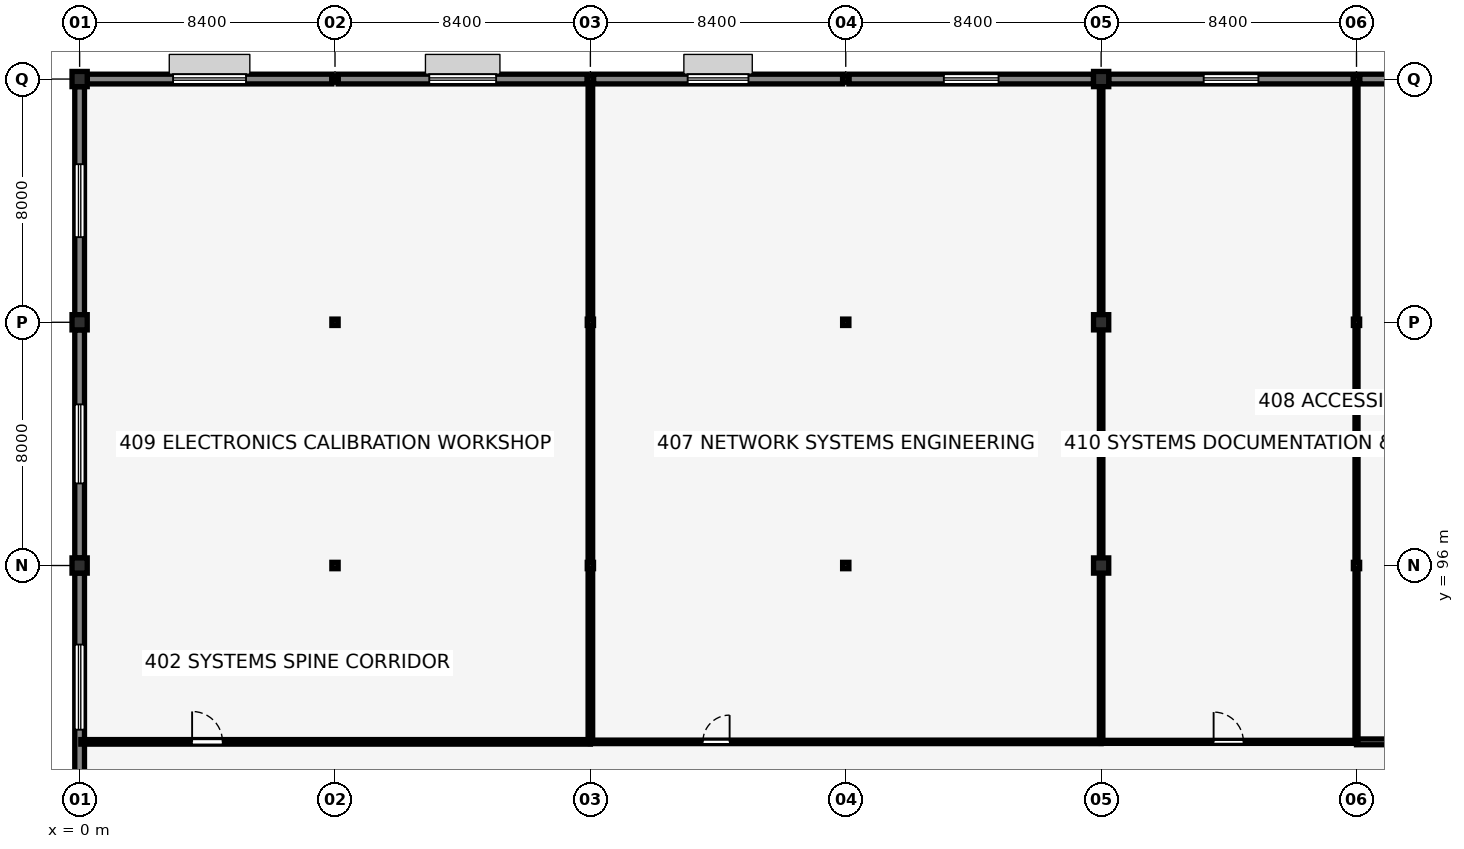
"""IFC4 building model, lengths in metres.
Left out: names, types, materials, properties, quantities, classifications, styles, units other than length and angle.
Written with IfcOpenShell. Run it as: python <this file> out.ifc"""

import sys

from ifc_helpers import new_model, si_unit, direction, frame, frame_2d, origin, origin_2d, place, context, subcontext, project, spatial, rectangle, i_section, extrude, element, fill, save


model = new_model("IFC4")
c1 = context("Model", 3, precision=1e-05, world=origin(), true_north=direction((0.0, 1.0)))
c2 = subcontext(c1, "Body", "Model", "MODEL_VIEW")
j1 = project(units=[si_unit("LENGTHUNIT", "METRE"), si_unit("PLANEANGLEUNIT", "RADIAN")], contexts=[c1])
p1 = place(None, origin())
s1 = spatial("IfcSite", under=j1, at=p1, CompositionType="ELEMENT")
p2 = place(p1, origin())
s2 = spatial("IfcBuilding", under=s1, at=p2, CompositionType="ELEMENT")
p3 = place(p2, frame((0.0, 0.0, 17.2)))
s3 = spatial("IfcBuildingStorey", under=s2, at=p3, CompositionType="ELEMENT", Elevation=17.2)
for number, where, z_axis, x_axis in (
    (1, (0.0, 96.0, 0.0), (0.0, 0.0, 1.0), (1.0, 0.0, 0.0)),
    (2, (0.0, 104.0, 0.0), (0.0, 0.0, 1.0), (1.0, 0.0, 0.0)),
    (3, (0.0, 112.0, 0.0), (0.0, 0.0, 1.0), (1.0, 0.0, 0.0)),
):
    element("IfcColumn", number, at=place(p3, frame(where, z_axis=z_axis, x_axis=x_axis)), inside=s3, PredefinedType="COLUMN", context=c2, shape_type="SweptSolid", body=[
        extrude(rectangle(XDim=0.5, YDim=0.5, at=origin_2d()), origin(), (0.0, 0.0, 1.0), 3.59),
    ])
for number, where, z_axis, x_axis in (
    (4, (8.4, 96.0, 0.0), (0.0, 0.0, 1.0), (1.0, 0.0, 0.0)),
    (5, (8.4, 104.0, 0.0), (0.0, 0.0, 1.0), (1.0, 0.0, 0.0)),
    (6, (8.4, 112.0, 0.0), (0.0, 0.0, 1.0), (1.0, 0.0, 0.0)),
    (7, (16.8, 96.0, 0.0), (0.0, 0.0, 1.0), (1.0, 0.0, 0.0)),
    (8, (16.8, 104.0, 0.0), (0.0, 0.0, 1.0), (1.0, 0.0, 0.0)),
    (9, (16.8, 112.0, 0.0), (0.0, 0.0, 1.0), (1.0, 0.0, 0.0)),
    (10, (25.2, 96.0, 0.0), (0.0, 0.0, 1.0), (1.0, 0.0, 0.0)),
    (11, (25.2, 104.0, 0.0), (0.0, 0.0, 1.0), (1.0, 0.0, 0.0)),
    (12, (25.2, 112.0, 0.0), (0.0, 0.0, 1.0), (1.0, 0.0, 0.0)),
):
    element("IfcColumn", number, at=place(p3, frame(where, z_axis=z_axis, x_axis=x_axis)), inside=s3, PredefinedType="COLUMN", context=c2, shape_type="SweptSolid", body=[
        extrude(i_section(OverallWidth=0.206, OverallDepth=0.21, WebThickness=0.01, FlangeThickness=0.014, FilletRadius=0.01, at=origin_2d()), origin(), (0.0, 0.0, 1.0), 3.59),
    ])
for number, where, z_axis, x_axis in (
    (13, (33.6, 96.0, 0.0), (0.0, 0.0, 1.0), (1.0, 0.0, 0.0)),
    (14, (33.6, 104.0, 0.0), (0.0, 0.0, 1.0), (1.0, 0.0, 0.0)),
    (15, (33.6, 112.0, 0.0), (0.0, 0.0, 1.0), (1.0, 0.0, 0.0)),
):
    element("IfcColumn", number, at=place(p3, frame(where, z_axis=z_axis, x_axis=x_axis)), inside=s3, PredefinedType="COLUMN", context=c2, shape_type="SweptSolid", body=[
        extrude(rectangle(XDim=0.5, YDim=0.5, at=origin_2d()), origin(), (0.0, 0.0, 1.0), 3.59),
    ])
for number, where, z_axis, x_axis in (
    (16, (42.0, 96.0, 0.0), (0.0, 0.0, 1.0), (1.0, 0.0, 0.0)),
    (17, (42.0, 104.0, 0.0), (0.0, 0.0, 1.0), (1.0, 0.0, 0.0)),
    (18, (42.0, 112.0, 0.0), (0.0, 0.0, 1.0), (1.0, 0.0, 0.0)),
):
    element("IfcColumn", number, at=place(p3, frame(where, z_axis=z_axis, x_axis=x_axis)), inside=s3, PredefinedType="COLUMN", context=c2, shape_type="SweptSolid", body=[
        extrude(i_section(OverallWidth=0.206, OverallDepth=0.21, WebThickness=0.01, FlangeThickness=0.014, FilletRadius=0.01, at=origin_2d()), origin(), (0.0, 0.0, 1.0), 3.59),
    ])
p4 = place(p3, frame((0.0, 88.25, 0.0), z_axis=(0.0, 0.0, 1.0), x_axis=(0.0, 1.0, 0.0)))
e19 = element("IfcWall", 19, at=p4, inside=s3, PredefinedType="SOLIDWALL", context=c2, shape_type="SweptSolid", body=[
    extrude(rectangle(XDim=7.5, YDim=0.32, at=frame_2d((3.75, 0.0))), origin(), (0.0, 0.0, 1.0), 3.29),
])
p5 = place(p4, frame((2.35, 0.0, 0.9), z_axis=(0.0, 0.0, 1.0), x_axis=(1.0, 0.0, 0.0)))
e20 = element("IfcOpeningElement", 20, at=p5, cuts=e19, PredefinedType="OPENING", context=c2, shape_type="SweptSolid", body=[
    extrude(rectangle(XDim=2.8, YDim=1.6, at=frame_2d((1.4, 0.8))), frame((0.0, 0.17, 0.0), z_axis=(0.0, -1.0, 0.0), x_axis=(1.0, 0.0, 0.0)), (0.0, 0.0, 1.0), 0.34),
])
p6 = place(p3, frame((0.0, 96.25, 0.0), z_axis=(0.0, 0.0, 1.0), x_axis=(0.0, 1.0, 0.0)))
e21 = element("IfcWall", 21, at=p6, inside=s3, PredefinedType="SOLIDWALL", context=c2, shape_type="SweptSolid", body=[
    extrude(rectangle(XDim=7.5, YDim=0.32, at=frame_2d((3.75, 0.0))), origin(), (0.0, 0.0, 1.0), 3.29),
])
p7 = place(p6, frame((2.45, 0.0, 0.9), z_axis=(0.0, 0.0, 1.0), x_axis=(1.0, 0.0, 0.0)))
e22 = element("IfcOpeningElement", 22, at=p7, cuts=e21, PredefinedType="OPENING", context=c2, shape_type="SweptSolid", body=[
    extrude(rectangle(XDim=2.6, YDim=1.8, at=frame_2d((1.3, 0.9))), frame((0.0, 0.17, 0.0), z_axis=(0.0, -1.0, 0.0), x_axis=(1.0, 0.0, 0.0)), (0.0, 0.0, 1.0), 0.34),
])
p8 = place(p3, frame((0.0, 104.25, 0.0), z_axis=(0.0, 0.0, 1.0), x_axis=(0.0, 1.0, 0.0)))
e23 = element("IfcWall", 23, at=p8, inside=s3, PredefinedType="SOLIDWALL", context=c2, shape_type="SweptSolid", body=[
    extrude(rectangle(XDim=7.5, YDim=0.32, at=frame_2d((3.75, 0.0))), origin(), (0.0, 0.0, 1.0), 3.29),
])
p9 = place(p8, frame((2.55, 0.0, 0.9), z_axis=(0.0, 0.0, 1.0), x_axis=(1.0, 0.0, 0.0)))
e24 = element("IfcOpeningElement", 24, at=p9, cuts=e23, PredefinedType="OPENING", context=c2, shape_type="SweptSolid", body=[
    extrude(rectangle(XDim=2.4, YDim=1.75, at=frame_2d((1.2, 0.875))), frame((0.0, 0.17, 0.0), z_axis=(0.0, -1.0, 0.0), x_axis=(1.0, 0.0, 0.0)), (0.0, 0.0, 1.0), 0.34),
])
p10 = place(p3, frame((0.25, 112.0, 0.0), z_axis=(0.0, 0.0, 1.0), x_axis=(1.0, 0.0, 0.0)))
e25 = element("IfcWall", 25, at=p10, inside=s3, PredefinedType="SOLIDWALL", context=c2, shape_type="SweptSolid", body=[
    extrude(rectangle(XDim=8.047, YDim=0.32, at=frame_2d((4.023, 0.0))), origin(), (0.0, 0.0, 1.0), 3.33),
])
p11 = place(p10, frame((2.823, 0.0, 0.9), z_axis=(0.0, 0.0, 1.0), x_axis=(1.0, 0.0, 0.0)))
e26 = element("IfcOpeningElement", 26, at=p11, cuts=e25, PredefinedType="OPENING", context=c2, shape_type="SweptSolid", body=[
    extrude(rectangle(XDim=2.4, YDim=1.5, at=frame_2d((1.2, 0.75))), frame((0.0, 0.17, 0.0), z_axis=(0.0, -1.0, 0.0), x_axis=(1.0, 0.0, 0.0)), (0.0, 0.0, 1.0), 0.34),
])
p12 = place(p3, frame((8.503, 112.0, 0.0), z_axis=(0.0, 0.0, 1.0), x_axis=(1.0, 0.0, 0.0)))
e27 = element("IfcWall", 27, at=p12, inside=s3, PredefinedType="SOLIDWALL", context=c2, shape_type="SweptSolid", body=[
    extrude(rectangle(XDim=8.194, YDim=0.32, at=frame_2d((4.097, 0.0))), origin(), (0.0, 0.0, 1.0), 3.33),
])
p13 = place(p12, frame((2.997, 0.0, 0.9), z_axis=(0.0, 0.0, 1.0), x_axis=(1.0, 0.0, 0.0)))
e28 = element("IfcOpeningElement", 28, at=p13, cuts=e27, PredefinedType="OPENING", context=c2, shape_type="SweptSolid", body=[
    extrude(rectangle(XDim=2.2, YDim=1.5, at=frame_2d((1.1, 0.75))), frame((0.0, 0.17, 0.0), z_axis=(0.0, -1.0, 0.0), x_axis=(1.0, 0.0, 0.0)), (0.0, 0.0, 1.0), 0.34),
])
p14 = place(p3, frame((16.903, 112.0, 0.0), z_axis=(0.0, 0.0, 1.0), x_axis=(1.0, 0.0, 0.0)))
e29 = element("IfcWall", 29, at=p14, inside=s3, PredefinedType="SOLIDWALL", context=c2, shape_type="SweptSolid", body=[
    extrude(rectangle(XDim=8.194, YDim=0.32, at=frame_2d((4.097, 0.0))), origin(), (0.0, 0.0, 1.0), 3.33),
])
p15 = place(p14, frame((3.097, 0.0, 0.9), z_axis=(0.0, 0.0, 1.0), x_axis=(1.0, 0.0, 0.0)))
e30 = element("IfcOpeningElement", 30, at=p15, cuts=e29, PredefinedType="OPENING", context=c2, shape_type="SweptSolid", body=[
    extrude(rectangle(XDim=2.0, YDim=1.5, at=frame_2d((1.0, 0.75))), frame((0.0, 0.17, 0.0), z_axis=(0.0, -1.0, 0.0), x_axis=(1.0, 0.0, 0.0)), (0.0, 0.0, 1.0), 0.34),
])
p16 = place(p3, frame((25.303, 112.0, 0.0), z_axis=(0.0, 0.0, 1.0), x_axis=(1.0, 0.0, 0.0)))
e31 = element("IfcWall", 31, at=p16, inside=s3, PredefinedType="SOLIDWALL", context=c2, shape_type="SweptSolid", body=[
    extrude(rectangle(XDim=8.047, YDim=0.32, at=frame_2d((4.023, 0.0))), origin(), (0.0, 0.0, 1.0), 3.33),
])
p17 = place(p16, frame((3.124, 0.0, 0.9), z_axis=(0.0, 0.0, 1.0), x_axis=(1.0, 0.0, 0.0)))
e32 = element("IfcOpeningElement", 32, at=p17, cuts=e31, PredefinedType="OPENING", context=c2, shape_type="SweptSolid", body=[
    extrude(rectangle(XDim=1.8, YDim=1.45, at=frame_2d((0.9, 0.725))), frame((0.0, 0.17, 0.0), z_axis=(0.0, -1.0, 0.0), x_axis=(1.0, 0.0, 0.0)), (0.0, 0.0, 1.0), 0.34),
])
p18 = place(p3, frame((33.85, 112.0, 0.0), z_axis=(0.0, 0.0, 1.0), x_axis=(1.0, 0.0, 0.0)))
e33 = element("IfcWall", 33, at=p18, inside=s3, PredefinedType="SOLIDWALL", context=c2, shape_type="SweptSolid", body=[
    extrude(rectangle(XDim=8.047, YDim=0.32, at=frame_2d((4.023, 0.0))), origin(), (0.0, 0.0, 1.0), 3.33),
])
p19 = place(p18, frame((3.124, 0.0, 0.9), z_axis=(0.0, 0.0, 1.0), x_axis=(1.0, 0.0, 0.0)))
e34 = element("IfcOpeningElement", 34, at=p19, cuts=e33, PredefinedType="OPENING", context=c2, shape_type="SweptSolid", body=[
    extrude(rectangle(XDim=1.8, YDim=1.3, at=frame_2d((0.9, 0.65))), frame((0.0, 0.17, 0.0), z_axis=(0.0, -1.0, 0.0), x_axis=(1.0, 0.0, 0.0)), (0.0, 0.0, 1.0), 0.34),
])
p20 = place(p3, frame((42.103, 112.0, 0.0), z_axis=(0.0, 0.0, 1.0), x_axis=(1.0, 0.0, 0.0)))
e35 = element("IfcWall", 35, at=p20, inside=s3, PredefinedType="SOLIDWALL", context=c2, shape_type="SweptSolid", body=[
    extrude(rectangle(XDim=8.194, YDim=0.32, at=frame_2d((4.097, 0.0))), origin(), (0.0, 0.0, 1.0), 3.33),
])
p21 = place(p20, frame((3.347, 0.0, 0.9), z_axis=(0.0, 0.0, 1.0), x_axis=(1.0, 0.0, 0.0)))
e36 = element("IfcOpeningElement", 36, at=p21, cuts=e35, PredefinedType="OPENING", context=c2, shape_type="SweptSolid", body=[
    extrude(rectangle(XDim=1.5, YDim=1.4, at=frame_2d((0.75, 0.7))), frame((0.0, 0.17, 0.0), z_axis=(0.0, -1.0, 0.0), x_axis=(1.0, 0.0, 0.0)), (0.0, 0.0, 1.0), 0.34),
])
p22 = place(p3, frame((0.04, 90.2, 0.0), z_axis=(0.0, 0.0, 1.0), x_axis=(1.0, 0.0, 0.0)))
e37 = element("IfcWall", 37, at=p22, inside=s3, PredefinedType="PARTITIONING", context=c2, shape_type="SweptSolid", body=[
    extrude(rectangle(XDim=16.76, YDim=0.15, at=frame_2d((8.38, 0.0))), origin(), (0.0, 0.0, 1.0), 3.137),
])
p23 = place(p22, frame((3.66, 0.0, 0.0), z_axis=(0.0, 0.0, 1.0), x_axis=(1.0, 0.0, 0.0)))
e38 = element("IfcOpeningElement", 38, at=p23, cuts=e37, PredefinedType="OPENING", context=c2, shape_type="SweptSolid", body=[
    extrude(rectangle(XDim=1.0, YDim=2.15, at=frame_2d((0.5, 1.075))), frame((0.0, 0.085, 0.0), z_axis=(0.0, -1.0, 0.0), x_axis=(1.0, 0.0, 0.0)), (0.0, 0.0, 1.0), 0.17),
])
p24 = place(p3, frame((16.8, 90.2, 0.0), z_axis=(0.0, 0.0, 1.0), x_axis=(1.0, 0.0, 0.0)))
e39 = element("IfcWall", 39, at=p24, inside=s3, PredefinedType="PARTITIONING", context=c2, shape_type="SweptSolid", body=[
    extrude(rectangle(XDim=16.8, YDim=0.115, at=frame_2d((8.4, 0.0))), origin(), (0.0, 0.0, 1.0), 3.137),
])
p25 = place(p24, frame((3.7, 0.0, 0.0), z_axis=(0.0, 0.0, 1.0), x_axis=(1.0, 0.0, 0.0)))
e40 = element("IfcOpeningElement", 40, at=p25, cuts=e39, PredefinedType="OPENING", context=c2, shape_type="SweptSolid", body=[
    extrude(rectangle(XDim=0.88, YDim=2.1, at=frame_2d((0.44, 1.05))), frame((0.0, 0.067, 0.0), z_axis=(0.0, -1.0, 0.0), x_axis=(1.0, 0.0, 0.0)), (0.0, 0.0, 1.0), 0.135),
])
p26 = place(p3, frame((33.6, 90.2, 0.0), z_axis=(0.0, 0.0, 1.0), x_axis=(1.0, 0.0, 0.0)))
e41 = element("IfcWall", 41, at=p26, inside=s3, PredefinedType="PARTITIONING", context=c2, shape_type="SweptSolid", body=[
    extrude(rectangle(XDim=8.4, YDim=0.1, at=frame_2d((4.2, 0.0))), origin(), (0.0, 0.0, 1.0), 3.59),
])
p27 = place(p26, frame((3.7, 0.0, 0.0), z_axis=(0.0, 0.0, 1.0), x_axis=(1.0, 0.0, 0.0)))
e42 = element("IfcOpeningElement", 42, at=p27, cuts=e41, PredefinedType="OPENING", context=c2, shape_type="SweptSolid", body=[
    extrude(rectangle(XDim=0.98, YDim=2.15, at=frame_2d((0.49, 1.075))), frame((0.0, 0.06, 0.0), z_axis=(0.0, -1.0, 0.0), x_axis=(1.0, 0.0, 0.0)), (0.0, 0.0, 1.0), 0.12),
])
p28 = place(p3, frame((42.0, 90.2, 0.0), z_axis=(0.0, 0.0, 1.0), x_axis=(1.0, 0.0, 0.0)))
e43 = element("IfcWall", 43, at=p28, inside=s3, PredefinedType="PLUMBINGWALL", context=c2, shape_type="SweptSolid", body=[
    extrude(rectangle(XDim=3.6, YDim=0.19, at=frame_2d((1.8, 0.0))), origin(), (0.0, 0.0, 1.0), 3.59),
])
p29 = place(p28, frame((1.3, 0.0, 0.0), z_axis=(0.0, 0.0, 1.0), x_axis=(1.0, 0.0, 0.0)))
e44 = element("IfcOpeningElement", 44, at=p29, cuts=e43, PredefinedType="OPENING", context=c2, shape_type="SweptSolid", body=[
    extrude(rectangle(XDim=0.95, YDim=2.15, at=frame_2d((0.475, 1.075))), frame((0.0, 0.105, 0.0), z_axis=(0.0, -1.0, 0.0), x_axis=(1.0, 0.0, 0.0)), (0.0, 0.0, 1.0), 0.21),
])
p30 = place(p3, frame((16.8, 90.2, 0.0), z_axis=(0.0, 0.0, 1.0), x_axis=(0.0, 1.0, 0.0)))
e45 = element("IfcWall", 45, at=p30, inside=s3, PredefinedType="PARTITIONING", context=c2, shape_type="SweptSolid", body=[
    extrude(rectangle(XDim=5.705, YDim=0.15, at=frame_2d((2.853, 0.0))), origin(), (0.0, 0.0, 1.0), 3.137),
])
for number, where, z_axis, x_axis in (
    (46, (16.8, 96.095, 0.0), (0.0, 0.0, 1.0), (0.0, 1.0, 0.0)),
    (47, (16.8, 104.095, 0.0), (0.0, 0.0, 1.0), (0.0, 1.0, 0.0)),
):
    element("IfcWall", number, at=place(p3, frame(where, z_axis=z_axis, x_axis=x_axis)), inside=s3, PredefinedType="PARTITIONING", context=c2, shape_type="SweptSolid", body=[
        extrude(rectangle(XDim=7.811, YDim=0.15, at=frame_2d((3.905, 0.0))), origin(), (0.0, 0.0, 1.0), 3.137),
    ])
p31 = place(p3, frame((33.6, 90.2, 0.0), z_axis=(0.0, 0.0, 1.0), x_axis=(0.0, 1.0, 0.0)))
e48 = element("IfcWall", 48, at=p31, inside=s3, PredefinedType="PARTITIONING", context=c2, shape_type="SweptSolid", body=[
    extrude(rectangle(XDim=5.56, YDim=0.115, at=frame_2d((2.78, 0.0))), origin(), (0.0, 0.0, 1.0), 3.137),
])
for number, where, z_axis, x_axis in (
    (49, (33.6, 96.24, 0.0), (0.0, 0.0, 1.0), (0.0, 1.0, 0.0)),
    (50, (33.6, 104.24, 0.0), (0.0, 0.0, 1.0), (0.0, 1.0, 0.0)),
):
    element("IfcWall", number, at=place(p3, frame(where, z_axis=z_axis, x_axis=x_axis)), inside=s3, PredefinedType="PARTITIONING", context=c2, shape_type="SweptSolid", body=[
        extrude(rectangle(XDim=7.52, YDim=0.115, at=frame_2d((3.76, 0.0))), origin(), (0.0, 0.0, 1.0), 3.137),
    ])
p32 = place(p3, frame((42.0, 90.2, 0.0), z_axis=(0.0, 0.0, 1.0), x_axis=(0.0, 1.0, 0.0)))
e51 = element("IfcWall", 51, at=p32, inside=s3, PredefinedType="PARTITIONING", context=c2, shape_type="SweptSolid", body=[
    extrude(rectangle(XDim=5.705, YDim=0.1, at=frame_2d((2.853, 0.0))), origin(), (0.0, 0.0, 1.0), 3.137),
])
for number, where, z_axis, x_axis in (
    (52, (42.0, 96.095, 0.0), (0.0, 0.0, 1.0), (0.0, 1.0, 0.0)),
    (53, (42.0, 104.095, 0.0), (0.0, 0.0, 1.0), (0.0, 1.0, 0.0)),
):
    element("IfcWall", number, at=place(p3, frame(where, z_axis=z_axis, x_axis=x_axis)), inside=s3, PredefinedType="PARTITIONING", context=c2, shape_type="SweptSolid", body=[
        extrude(rectangle(XDim=7.811, YDim=0.1, at=frame_2d((3.905, 0.0))), origin(), (0.0, 0.0, 1.0), 3.137),
    ])
p33 = place(p5, origin())
e54 = element("IfcWindow", 54, at=p33, inside=s3, PartitioningType="DOUBLE_PANEL_VERTICAL", PredefinedType="WINDOW", context=c2, shape_type="SweptSolid", body=[
    extrude(rectangle(XDim=2.8, YDim=1.6, at=frame_2d((1.4, 0.8))), frame((0.0, 0.03, 0.0), z_axis=(0.0, -1.0, 0.0), x_axis=(1.0, 0.0, 0.0)), (0.0, 0.0, 1.0), 0.06),
])
fill(e20, e54)
p34 = place(p7, origin())
e55 = element("IfcWindow", 55, at=p34, inside=s3, PartitioningType="DOUBLE_PANEL_VERTICAL", PredefinedType="WINDOW", context=c2, shape_type="SweptSolid", body=[
    extrude(rectangle(XDim=2.6, YDim=1.8, at=frame_2d((1.3, 0.9))), frame((0.0, 0.03, 0.0), z_axis=(0.0, -1.0, 0.0), x_axis=(1.0, 0.0, 0.0)), (0.0, 0.0, 1.0), 0.06),
])
fill(e22, e55)
p35 = place(p9, origin())
e56 = element("IfcWindow", 56, at=p35, inside=s3, PartitioningType="DOUBLE_PANEL_VERTICAL", PredefinedType="WINDOW", context=c2, shape_type="SweptSolid", body=[
    extrude(rectangle(XDim=2.4, YDim=1.75, at=frame_2d((1.2, 0.875))), frame((0.0, 0.03, 0.0), z_axis=(0.0, -1.0, 0.0), x_axis=(1.0, 0.0, 0.0)), (0.0, 0.0, 1.0), 0.06),
])
fill(e24, e56)
p36 = place(p11, origin())
e57 = element("IfcWindow", 57, at=p36, inside=s3, PartitioningType="DOUBLE_PANEL_VERTICAL", PredefinedType="WINDOW", context=c2, shape_type="SweptSolid", body=[
    extrude(rectangle(XDim=2.4, YDim=1.5, at=frame_2d((1.2, 0.75))), frame((0.0, 0.03, 0.0), z_axis=(0.0, -1.0, 0.0), x_axis=(1.0, 0.0, 0.0)), (0.0, 0.0, 1.0), 0.06),
])
fill(e26, e57)
p37 = place(p13, origin())
e58 = element("IfcWindow", 58, at=p37, inside=s3, PartitioningType="DOUBLE_PANEL_VERTICAL", PredefinedType="WINDOW", context=c2, shape_type="SweptSolid", body=[
    extrude(rectangle(XDim=2.2, YDim=1.5, at=frame_2d((1.1, 0.75))), frame((0.0, 0.03, 0.0), z_axis=(0.0, -1.0, 0.0), x_axis=(1.0, 0.0, 0.0)), (0.0, 0.0, 1.0), 0.06),
])
fill(e28, e58)
p38 = place(p15, origin())
e59 = element("IfcWindow", 59, at=p38, inside=s3, PartitioningType="DOUBLE_PANEL_VERTICAL", PredefinedType="WINDOW", context=c2, shape_type="SweptSolid", body=[
    extrude(rectangle(XDim=2.0, YDim=1.5, at=frame_2d((1.0, 0.75))), frame((0.0, 0.03, 0.0), z_axis=(0.0, -1.0, 0.0), x_axis=(1.0, 0.0, 0.0)), (0.0, 0.0, 1.0), 0.06),
])
fill(e30, e59)
p39 = place(p17, origin())
e60 = element("IfcWindow", 60, at=p39, inside=s3, PartitioningType="DOUBLE_PANEL_VERTICAL", PredefinedType="WINDOW", context=c2, shape_type="SweptSolid", body=[
    extrude(rectangle(XDim=1.8, YDim=1.45, at=frame_2d((0.9, 0.725))), frame((0.0, 0.03, 0.0), z_axis=(0.0, -1.0, 0.0), x_axis=(1.0, 0.0, 0.0)), (0.0, 0.0, 1.0), 0.06),
])
fill(e32, e60)
p40 = place(p19, origin())
e61 = element("IfcWindow", 61, at=p40, inside=s3, PartitioningType="DOUBLE_PANEL_VERTICAL", PredefinedType="WINDOW", context=c2, shape_type="SweptSolid", body=[
    extrude(rectangle(XDim=1.8, YDim=1.3, at=frame_2d((0.9, 0.65))), frame((0.0, 0.03, 0.0), z_axis=(0.0, -1.0, 0.0), x_axis=(1.0, 0.0, 0.0)), (0.0, 0.0, 1.0), 0.06),
])
fill(e34, e61)
p41 = place(p23, origin())
e62 = element("IfcDoor", 62, at=p41, inside=s3, OperationType="SINGLE_SWING_LEFT", PredefinedType="DOOR", context=c2, shape_type="SweptSolid", body=[
    extrude(rectangle(XDim=1.0, YDim=2.15, at=frame_2d((0.5, 1.075))), frame((0.0, 0.025, 0.0), z_axis=(0.0, -1.0, 0.0), x_axis=(1.0, 0.0, 0.0)), (0.0, 0.0, 1.0), 0.05),
])
fill(e38, e62)
p42 = place(p25, origin())
e63 = element("IfcDoor", 63, at=p42, inside=s3, OperationType="SINGLE_SWING_RIGHT", PredefinedType="DOOR", context=c2, shape_type="SweptSolid", body=[
    extrude(rectangle(XDim=0.88, YDim=2.1, at=frame_2d((0.44, 1.05))), frame((0.0, 0.025, 0.0), z_axis=(0.0, -1.0, 0.0), x_axis=(1.0, 0.0, 0.0)), (0.0, 0.0, 1.0), 0.05),
])
fill(e40, e63)
p43 = place(p27, origin())
e64 = element("IfcDoor", 64, at=p43, inside=s3, OperationType="SINGLE_SWING_LEFT", PredefinedType="DOOR", context=c2, shape_type="SweptSolid", body=[
    extrude(rectangle(XDim=0.98, YDim=2.15, at=frame_2d((0.49, 1.075))), frame((0.0, 0.025, 0.0), z_axis=(0.0, -1.0, 0.0), x_axis=(1.0, 0.0, 0.0)), (0.0, 0.0, 1.0), 0.05),
])
fill(e42, e64)
save(model, sys.argv[1])
